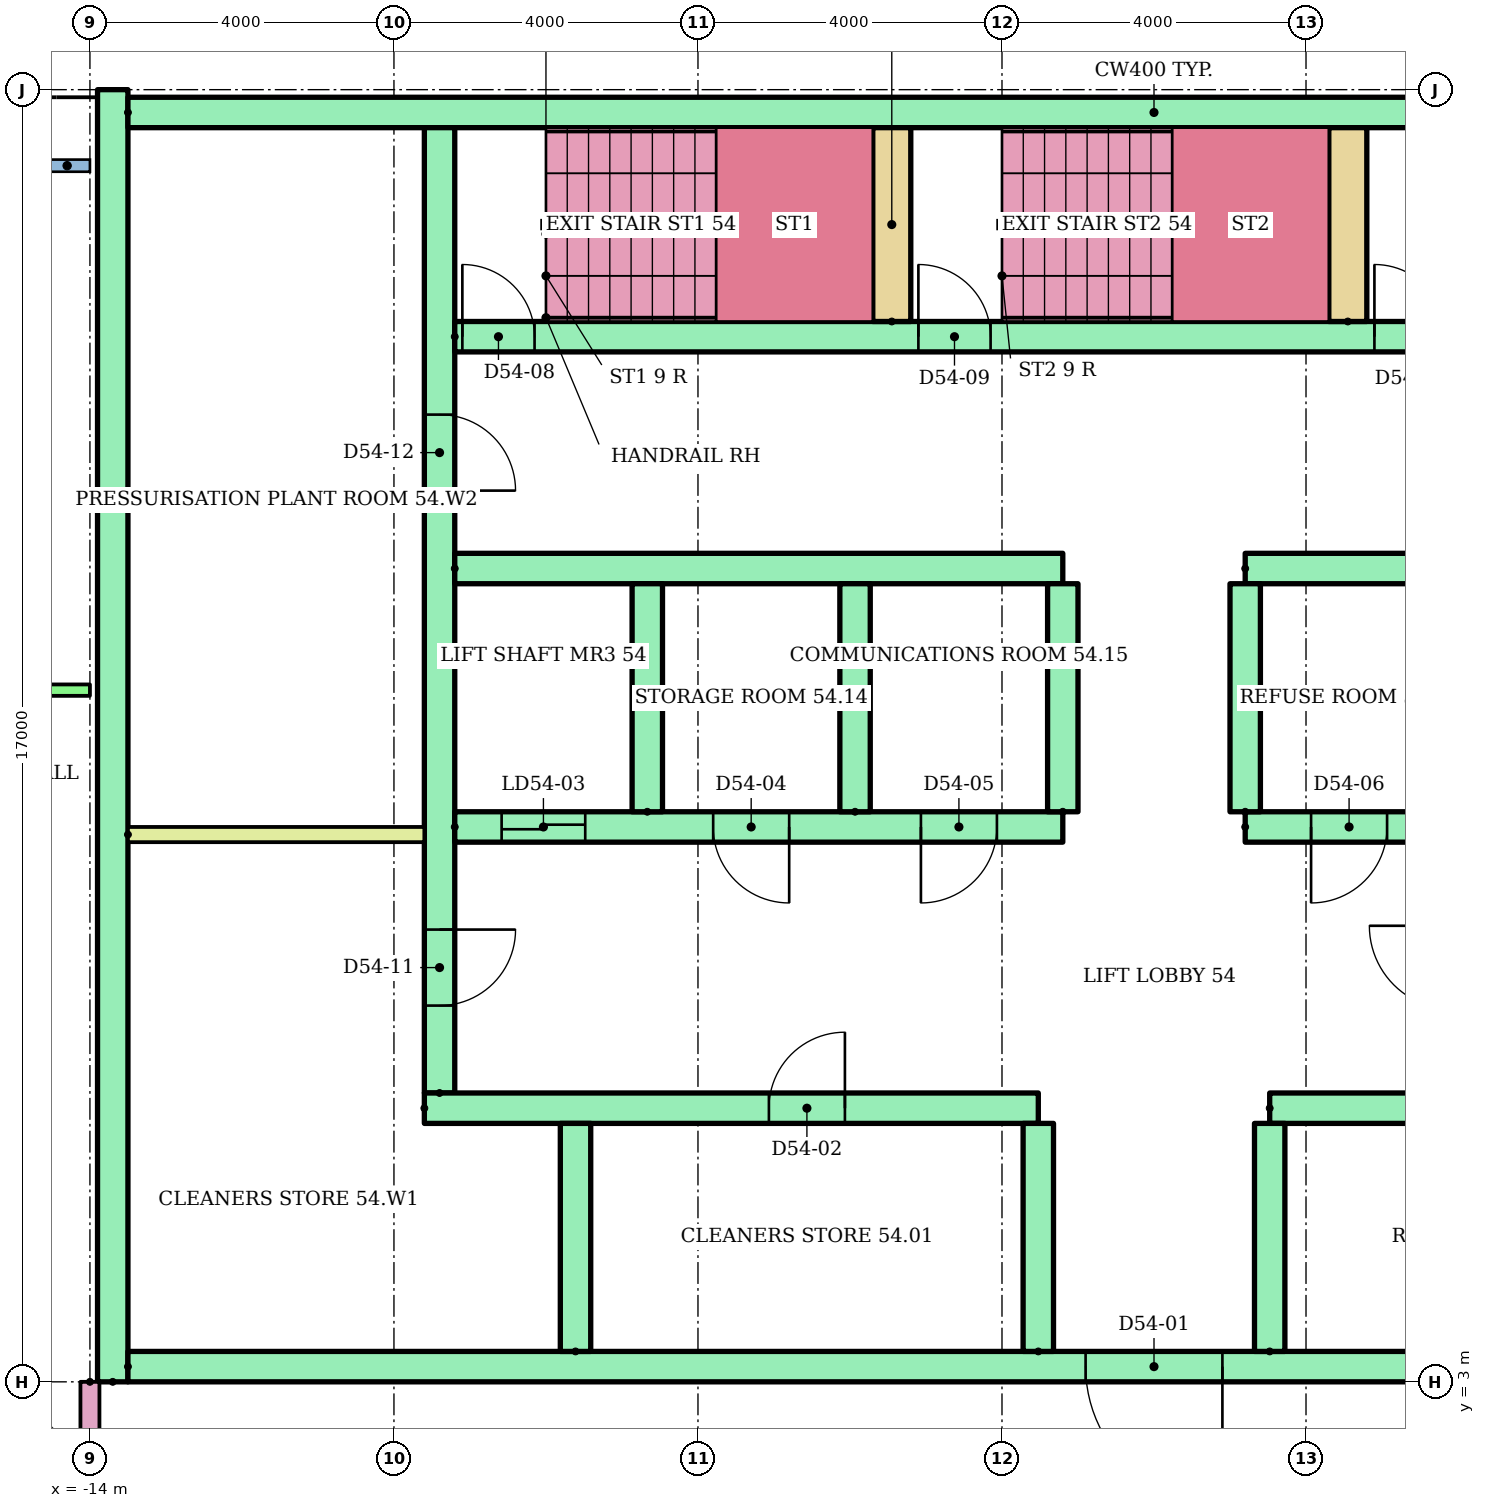
"""IFC4 building model, lengths in metres.
Left out: names, types, materials, properties, quantities, classifications, styles, units other than length and angle.
Written with IfcOpenShell. Run it as: python <this file> out.ifc"""

import sys

from ifc_helpers import new_model, si_unit, direction, frame, frame_2d, origin, place, context, subcontext, project, spatial, rectangle, extrude, element, fill, save


model = new_model("IFC4")
c1 = context("Model", 3, precision=1e-05, world=origin(), true_north=direction((0.0, 1.0)))
c2 = subcontext(c1, "Body", "Model", "MODEL_VIEW")
j1 = project(units=[si_unit("LENGTHUNIT", "METRE"), si_unit("PLANEANGLEUNIT", "RADIAN")], contexts=[c1])
p1 = place(None, origin())
s1 = spatial("IfcSite", under=j1, at=p1, CompositionType="ELEMENT")
p2 = place(p1, origin())
s2 = spatial("IfcBuilding", under=s1, at=p2, CompositionType="ELEMENT")
p3 = place(p2, frame((0.0, 0.0, 210.8)))
s3 = spatial("IfcBuildingStorey", under=s2, at=p3, CompositionType="ELEMENT", Elevation=210.8)
p4 = place(p3, frame((-13.7, 3.0, 0.0), z_axis=(0.0, 0.0, 1.0), x_axis=(0.0, 1.0, 0.0)))
e1 = element("IfcWall", 1, at=p4, inside=s3, PredefinedType="SHEAR", context=c2, shape_type="SweptSolid", body=[
    extrude(rectangle(XDim=17.0, YDim=0.4, at=frame_2d((8.5, 0.0))), origin(), (0.0, 0.0, 1.0), 2.92),
])
p5 = place(p3, frame((-13.5, 19.7, 0.0)))
e2 = element("IfcWall", 2, at=p5, inside=s3, PredefinedType="SHEAR", context=c2, shape_type="SweptSolid", body=[
    extrude(rectangle(XDim=27.0, YDim=0.4, at=frame_2d((13.5, 0.0))), origin(), (0.0, 0.0, 1.0), 2.92),
])
p6 = place(p3, frame((-9.4, 6.8, 0.0), z_axis=(0.0, 0.0, 1.0), x_axis=(0.0, 1.0, 0.0)))
e3 = element("IfcWall", 3, at=p6, inside=s3, PredefinedType="SHEAR", context=c2, shape_type="SweptSolid", body=[
    extrude(rectangle(XDim=12.7, YDim=0.4, at=frame_2d((6.35, 0.0))), origin(), (0.0, 0.0, 1.0), 2.92),
])
p7 = place(p6, frame((1.15, 0.0, 0.0)))
e4 = element("IfcOpeningElement", 4, at=p7, cuts=e3, PredefinedType="OPENING", context=c2, shape_type="SweptSolid", body=[
    extrude(rectangle(XDim=1.0, YDim=2.1, at=frame_2d((0.5, 1.05))), frame((0.0, 0.21, 0.0), z_axis=(0.0, -1.0, 0.0), x_axis=(1.0, 0.0, 0.0)), (0.0, 0.0, 1.0), 0.42),
])
p8 = place(p6, frame((7.925, 0.0, 0.0)))
e5 = element("IfcOpeningElement", 5, at=p8, cuts=e3, PredefinedType="OPENING", context=c2, shape_type="SweptSolid", body=[
    extrude(rectangle(XDim=1.0, YDim=2.1, at=frame_2d((0.5, 1.05))), frame((0.0, 0.21, 0.0), z_axis=(0.0, -1.0, 0.0), x_axis=(1.0, 0.0, 0.0)), (0.0, 0.0, 1.0), 0.42),
])
p9 = place(p3, frame((-13.5, 3.2, 0.0)))
e6 = element("IfcWall", 6, at=p9, inside=s3, PredefinedType="SHEAR", context=c2, shape_type="SweptSolid", body=[
    extrude(rectangle(XDim=27.0, YDim=0.4, at=frame_2d((13.5, 0.0))), origin(), (0.0, 0.0, 1.0), 2.92),
])
p10 = place(p9, frame((22.083, 0.0, 0.0)))
e7 = element("IfcOpeningElement", 7, at=p10, cuts=e6, PredefinedType="OPENING", context=c2, shape_type="SweptSolid", body=[
    extrude(rectangle(XDim=1.1, YDim=2.1, at=frame_2d((0.55, 1.05))), frame((0.0, 0.21, 0.0), z_axis=(0.0, -1.0, 0.0), x_axis=(1.0, 0.0, 0.0)), (0.0, 0.0, 1.0), 0.42),
])
p11 = place(p9, frame((25.128, 0.0, 0.0)))
e8 = element("IfcOpeningElement", 8, at=p11, cuts=e6, PredefinedType="OPENING", context=c2, shape_type="SweptSolid", body=[
    extrude(rectangle(XDim=1.1, YDim=2.1, at=frame_2d((0.55, 1.05))), frame((0.0, 0.21, 0.0), z_axis=(0.0, -1.0, 0.0), x_axis=(1.0, 0.0, 0.0)), (0.0, 0.0, 1.0), 0.42),
])
p12 = place(p9, frame((12.6, 0.0, 0.0)))
e9 = element("IfcOpeningElement", 9, at=p12, cuts=e6, PredefinedType="OPENING", context=c2, shape_type="SweptSolid", body=[
    extrude(rectangle(XDim=1.8, YDim=2.1, at=frame_2d((0.9, 1.05))), frame((0.0, 0.21, 0.0), z_axis=(0.0, -1.0, 0.0), x_axis=(1.0, 0.0, 0.0)), (0.0, 0.0, 1.0), 0.42),
])
p13 = place(p3, frame((-9.6, 6.6, 0.0)))
e10 = element("IfcWall", 10, at=p13, inside=s3, PredefinedType="SHEAR", context=c2, shape_type="SweptSolid", body=[
    extrude(rectangle(XDim=8.078, YDim=0.4, at=frame_2d((4.039, 0.0))), origin(), (0.0, 0.0, 1.0), 2.92),
])
p14 = place(p13, frame((4.533, 0.0, 0.0)))
e11 = element("IfcOpeningElement", 11, at=p14, cuts=e10, PredefinedType="OPENING", context=c2, shape_type="SweptSolid", body=[
    extrude(rectangle(XDim=1.0, YDim=2.1, at=frame_2d((0.5, 1.05))), frame((0.0, 0.21, 0.0), z_axis=(0.0, -1.0, 0.0), x_axis=(1.0, 0.0, 0.0)), (0.0, 0.0, 1.0), 0.42),
])
p15 = place(p3, frame((1.522, 6.6, 0.0)))
e12 = element("IfcWall", 12, at=p15, inside=s3, PredefinedType="SHEAR", context=c2, shape_type="SweptSolid", body=[
    extrude(rectangle(XDim=11.978, YDim=0.4, at=frame_2d((5.989, 0.0))), origin(), (0.0, 0.0, 1.0), 2.92),
])
p16 = place(p15, frame((2.544, 0.0, 0.0)))
e13 = element("IfcOpeningElement", 13, at=p16, cuts=e12, PredefinedType="OPENING", context=c2, shape_type="SweptSolid", body=[
    extrude(rectangle(XDim=1.0, YDim=2.1, at=frame_2d((0.5, 1.05))), frame((0.0, 0.21, 0.0), z_axis=(0.0, -1.0, 0.0), x_axis=(1.0, 0.0, 0.0)), (0.0, 0.0, 1.0), 0.42),
])
for number, where, z_axis, x_axis in (
    (14, (-7.611, 3.4, 0.0), (0.0, 0.0, 1.0), (0.0, 1.0, 0.0)),
    (15, (-1.522, 3.4, 0.0), (0.0, 0.0, 1.0), (0.0, 1.0, 0.0)),
    (16, (1.522, 3.4, 0.0), (0.0, 0.0, 1.0), (0.0, 1.0, 0.0)),
):
    element("IfcWall", number, at=place(p3, frame(where, z_axis=z_axis, x_axis=x_axis)), inside=s3, PredefinedType="SHEAR", context=c2, shape_type="SweptSolid", body=[
        extrude(rectangle(XDim=3.0, YDim=0.4, at=frame_2d((1.5, 0.0))), origin(), (0.0, 0.0, 1.0), 2.92),
    ])
p17 = place(p3, frame((-9.2, 10.3, 0.0)))
e17 = element("IfcWall", 17, at=p17, inside=s3, PredefinedType="SHEAR", context=c2, shape_type="SweptSolid", body=[
    extrude(rectangle(XDim=8.0, YDim=0.4, at=frame_2d((4.0, 0.0))), origin(), (0.0, 0.0, 1.0), 2.92),
])
p18 = place(p17, frame((0.617, 0.0, 0.0)))
e18 = element("IfcOpeningElement", 18, at=p18, cuts=e17, PredefinedType="OPENING", context=c2, shape_type="SweptSolid", body=[
    extrude(rectangle(XDim=1.1, YDim=2.1, at=frame_2d((0.55, 1.05))), frame((0.0, 0.21, 0.0), z_axis=(0.0, -1.0, 0.0), x_axis=(1.0, 0.0, 0.0)), (0.0, 0.0, 1.0), 0.42),
])
p19 = place(p17, frame((3.4, 0.0, 0.0)))
e19 = element("IfcOpeningElement", 19, at=p19, cuts=e17, PredefinedType="OPENING", context=c2, shape_type="SweptSolid", body=[
    extrude(rectangle(XDim=1.0, YDim=2.1, at=frame_2d((0.5, 1.05))), frame((0.0, 0.21, 0.0), z_axis=(0.0, -1.0, 0.0), x_axis=(1.0, 0.0, 0.0)), (0.0, 0.0, 1.0), 0.42),
])
p20 = place(p17, frame((6.133, 0.0, 0.0)))
e20 = element("IfcOpeningElement", 20, at=p20, cuts=e17, PredefinedType="OPENING", context=c2, shape_type="SweptSolid", body=[
    extrude(rectangle(XDim=1.0, YDim=2.1, at=frame_2d((0.5, 1.05))), frame((0.0, 0.21, 0.0), z_axis=(0.0, -1.0, 0.0), x_axis=(1.0, 0.0, 0.0)), (0.0, 0.0, 1.0), 0.42),
])
p21 = place(p3, frame((-9.2, 13.7, 0.0)))
e21 = element("IfcWall", 21, at=p21, inside=s3, PredefinedType="SHEAR", context=c2, shape_type="SweptSolid", body=[
    extrude(rectangle(XDim=8.0, YDim=0.4, at=frame_2d((4.0, 0.0))), origin(), (0.0, 0.0, 1.0), 2.92),
])
p22 = place(p3, frame((1.2, 10.3, 0.0)))
e22 = element("IfcWall", 22, at=p22, inside=s3, PredefinedType="SHEAR", context=c2, shape_type="SweptSolid", body=[
    extrude(rectangle(XDim=8.0, YDim=0.4, at=frame_2d((4.0, 0.0))), origin(), (0.0, 0.0, 1.0), 2.92),
])
p23 = place(p22, frame((3.55, 0.0, 0.0)))
e23 = element("IfcOpeningElement", 23, at=p23, cuts=e22, PredefinedType="OPENING", context=c2, shape_type="SweptSolid", body=[
    extrude(rectangle(XDim=1.1, YDim=2.1, at=frame_2d((0.55, 1.05))), frame((0.0, 0.21, 0.0), z_axis=(0.0, -1.0, 0.0), x_axis=(1.0, 0.0, 0.0)), (0.0, 0.0, 1.0), 0.42),
])
p24 = place(p22, frame((6.283, 0.0, 0.0)))
e24 = element("IfcOpeningElement", 24, at=p24, cuts=e22, PredefinedType="OPENING", context=c2, shape_type="SweptSolid", body=[
    extrude(rectangle(XDim=1.1, YDim=2.1, at=frame_2d((0.55, 1.05))), frame((0.0, 0.21, 0.0), z_axis=(0.0, -1.0, 0.0), x_axis=(1.0, 0.0, 0.0)), (0.0, 0.0, 1.0), 0.42),
])
p25 = place(p22, frame((0.867, 0.0, 0.0)))
e25 = element("IfcOpeningElement", 25, at=p25, cuts=e22, PredefinedType="OPENING", context=c2, shape_type="SweptSolid", body=[
    extrude(rectangle(XDim=1.0, YDim=2.1, at=frame_2d((0.5, 1.05))), frame((0.0, 0.21, 0.0), z_axis=(0.0, -1.0, 0.0), x_axis=(1.0, 0.0, 0.0)), (0.0, 0.0, 1.0), 0.42),
])
p26 = place(p3, frame((1.2, 13.7, 0.0)))
e26 = element("IfcWall", 26, at=p26, inside=s3, PredefinedType="SHEAR", context=c2, shape_type="SweptSolid", body=[
    extrude(rectangle(XDim=8.0, YDim=0.4, at=frame_2d((4.0, 0.0))), origin(), (0.0, 0.0, 1.0), 2.92),
])
for number, where, z_axis, x_axis in (
    (27, (-6.667, 10.5, 0.0), (0.0, 0.0, 1.0), (0.0, 1.0, 0.0)),
    (28, (-3.933, 10.5, 0.0), (0.0, 0.0, 1.0), (0.0, 1.0, 0.0)),
    (29, (-1.2, 10.5, 0.0), (0.0, 0.0, 1.0), (0.0, 1.0, 0.0)),
    (30, (1.2, 10.5, 0.0), (0.0, 0.0, 1.0), (0.0, 1.0, 0.0)),
):
    element("IfcWall", number, at=place(p3, frame(where, z_axis=z_axis, x_axis=x_axis)), inside=s3, PredefinedType="SHEAR", context=c2, shape_type="SweptSolid", body=[
        extrude(rectangle(XDim=3.0, YDim=0.4, at=frame_2d((1.5, 0.0))), origin(), (0.0, 0.0, 1.0), 2.92),
    ])
p27 = place(p3, frame((-9.2, 16.75, 0.0)))
e31 = element("IfcWall", 31, at=p27, inside=s3, PredefinedType="SHEAR", context=c2, shape_type="SweptSolid", body=[
    extrude(rectangle(XDim=18.4, YDim=0.4, at=frame_2d((9.2, 0.0))), origin(), (0.0, 0.0, 1.0), 2.92),
])
p28 = place(p27, frame((0.1, 0.0, 0.0)))
e32 = element("IfcOpeningElement", 32, at=p28, cuts=e31, PredefinedType="OPENING", context=c2, shape_type="SweptSolid", body=[
    extrude(rectangle(XDim=0.95, YDim=2.1, at=frame_2d((0.475, 1.05))), frame((0.0, 0.21, 0.0), z_axis=(0.0, -1.0, 0.0), x_axis=(1.0, 0.0, 0.0)), (0.0, 0.0, 1.0), 0.42),
])
p29 = place(p27, frame((6.1, 0.0, 0.0)))
e33 = element("IfcOpeningElement", 33, at=p29, cuts=e31, PredefinedType="OPENING", context=c2, shape_type="SweptSolid", body=[
    extrude(rectangle(XDim=0.95, YDim=2.1, at=frame_2d((0.475, 1.05))), frame((0.0, 0.21, 0.0), z_axis=(0.0, -1.0, 0.0), x_axis=(1.0, 0.0, 0.0)), (0.0, 0.0, 1.0), 0.42),
])
p30 = place(p27, frame((12.1, 0.0, 0.0)))
e34 = element("IfcOpeningElement", 34, at=p30, cuts=e31, PredefinedType="OPENING", context=c2, shape_type="SweptSolid", body=[
    extrude(rectangle(XDim=0.95, YDim=2.1, at=frame_2d((0.475, 1.05))), frame((0.0, 0.21, 0.0), z_axis=(0.0, -1.0, 0.0), x_axis=(1.0, 0.0, 0.0)), (0.0, 0.0, 1.0), 0.42),
])
for number, where, z_axis, x_axis in (
    (35, (-3.45, 16.95, 0.0), (0.0, 0.0, 1.0), (0.0, 1.0, 0.0)),
    (36, (2.55, 16.95, 0.0), (0.0, 0.0, 1.0), (0.0, 1.0, 0.0)),
):
    element("IfcWall", number, at=place(p3, frame(where, z_axis=z_axis, x_axis=x_axis)), inside=s3, PredefinedType="SHEAR", context=c2, shape_type="SweptSolid", body=[
        extrude(rectangle(XDim=2.55, YDim=0.5, at=frame_2d((1.275, 0.0))), origin(), (0.0, 0.0, 1.0), 2.92),
    ])
p31 = place(p3, frame((-13.5, 10.2, 0.0)))
e37 = element("IfcWall", 37, at=p31, inside=s3, PredefinedType="PARTITIONING", context=c2, shape_type="SweptSolid", body=[
    extrude(rectangle(XDim=3.9, YDim=0.2, at=frame_2d((1.95, 0.0))), origin(), (0.0, 0.0, 1.0), 2.92),
])
p32 = place(p3, frame((-28.92, 12.1, 0.0)))
e38 = element("IfcWall", 38, at=p32, inside=s3, PredefinedType="PARTITIONING", context=c2, shape_type="SweptSolid", body=[
    extrude(rectangle(XDim=14.92, YDim=0.15, at=frame_2d((7.46, 0.0))), origin(), (0.0, 0.0, 1.0), 2.4),
])
p33 = place(p32, frame((1.97, 0.0, 0.0)))
e39 = element("IfcOpeningElement", 39, at=p33, cuts=e38, PredefinedType="OPENING", context=c2, shape_type="SweptSolid", body=[
    extrude(rectangle(XDim=1.0, YDim=2.1, at=frame_2d((0.5, 1.05))), frame((0.0, 0.085, 0.0), z_axis=(0.0, -1.0, 0.0), x_axis=(1.0, 0.0, 0.0)), (0.0, 0.0, 1.0), 0.17),
])
p34 = place(p32, frame((9.37, 0.0, 0.0)))
e40 = element("IfcOpeningElement", 40, at=p34, cuts=e38, PredefinedType="OPENING", context=c2, shape_type="SweptSolid", body=[
    extrude(rectangle(XDim=0.9, YDim=2.1, at=frame_2d((0.45, 1.05))), frame((0.0, 0.085, 0.0), z_axis=(0.0, -1.0, 0.0), x_axis=(1.0, 0.0, 0.0)), (0.0, 0.0, 1.0), 0.17),
])
p35 = place(p3, frame((-14.0, 3.0, 0.0), z_axis=(0.0, 0.0, 1.0), x_axis=(0.0, -1.0, 0.0)))
e41 = element("IfcWall", 41, at=p35, inside=s3, PredefinedType="PARTITIONING", context=c2, shape_type="SweptSolid", body=[
    extrude(rectangle(XDim=1.6, YDim=0.25, at=frame_2d((0.8, 0.0))), origin(), (0.0, 0.0, 1.0), 2.4),
])
p36 = place(p12, frame((1.8, 0.0, 0.0), z_axis=(0.0, 0.0, 1.0), x_axis=(-1.0, 0.0, 0.0)))
e42 = element("IfcDoor", 42, at=p36, inside=s3, OperationType="DOUBLE_DOOR_SINGLE_SWING", PredefinedType="DOOR", context=c2, shape_type="SweptSolid", body=[
    extrude(rectangle(XDim=1.8, YDim=2.1, at=frame_2d((0.9, 1.05))), frame((0.0, 0.025, 0.0), z_axis=(0.0, -1.0, 0.0), x_axis=(1.0, 0.0, 0.0)), (0.0, 0.0, 1.0), 0.05),
])
fill(e9, e42)
p37 = place(p14, origin())
e43 = element("IfcDoor", 43, at=p37, inside=s3, OperationType="SINGLE_SWING_RIGHT", PredefinedType="DOOR", context=c2, shape_type="SweptSolid", body=[
    extrude(rectangle(XDim=1.0, YDim=2.1, at=frame_2d((0.5, 1.05))), frame((0.0, 0.025, 0.0), z_axis=(0.0, -1.0, 0.0), x_axis=(1.0, 0.0, 0.0)), (0.0, 0.0, 1.0), 0.05),
])
fill(e11, e43)
p38 = place(p18, origin())
e44 = element("IfcDoor", 44, at=p38, inside=s3, OperationType="SLIDING_TO_LEFT", PredefinedType="DOOR", context=c2, shape_type="SweptSolid", body=[
    extrude(rectangle(XDim=1.1, YDim=2.1, at=frame_2d((0.55, 1.05))), frame((0.0, 0.025, 0.0), z_axis=(0.0, -1.0, 0.0), x_axis=(1.0, 0.0, 0.0)), (0.0, 0.0, 1.0), 0.05),
])
fill(e18, e44)
p39 = place(p19, frame((1.0, 0.0, 0.0), z_axis=(0.0, 0.0, 1.0), x_axis=(-1.0, 0.0, 0.0)))
e45 = element("IfcDoor", 45, at=p39, inside=s3, OperationType="SINGLE_SWING_RIGHT", PredefinedType="DOOR", context=c2, shape_type="SweptSolid", body=[
    extrude(rectangle(XDim=1.0, YDim=2.1, at=frame_2d((0.5, 1.05))), frame((0.0, 0.025, 0.0), z_axis=(0.0, -1.0, 0.0), x_axis=(1.0, 0.0, 0.0)), (0.0, 0.0, 1.0), 0.05),
])
fill(e19, e45)
p40 = place(p20, frame((1.0, 0.0, 0.0), z_axis=(0.0, 0.0, 1.0), x_axis=(-1.0, 0.0, 0.0)))
e46 = element("IfcDoor", 46, at=p40, inside=s3, OperationType="SINGLE_SWING_LEFT", PredefinedType="DOOR", context=c2, shape_type="SweptSolid", body=[
    extrude(rectangle(XDim=1.0, YDim=2.1, at=frame_2d((0.5, 1.05))), frame((0.0, 0.025, 0.0), z_axis=(0.0, -1.0, 0.0), x_axis=(1.0, 0.0, 0.0)), (0.0, 0.0, 1.0), 0.05),
])
fill(e20, e46)
p41 = place(p25, frame((1.0, 0.0, 0.0), z_axis=(0.0, 0.0, 1.0), x_axis=(-1.0, 0.0, 0.0)))
e47 = element("IfcDoor", 47, at=p41, inside=s3, OperationType="SINGLE_SWING_LEFT", PredefinedType="DOOR", context=c2, shape_type="SweptSolid", body=[
    extrude(rectangle(XDim=1.0, YDim=2.1, at=frame_2d((0.5, 1.05))), frame((0.0, 0.025, 0.0), z_axis=(0.0, -1.0, 0.0), x_axis=(1.0, 0.0, 0.0)), (0.0, 0.0, 1.0), 0.05),
])
fill(e25, e47)
p42 = place(p28, origin())
e48 = element("IfcDoor", 48, at=p42, inside=s3, OperationType="SINGLE_SWING_LEFT", PredefinedType="DOOR", context=c2, shape_type="SweptSolid", body=[
    extrude(rectangle(XDim=0.95, YDim=2.1, at=frame_2d((0.475, 1.05))), frame((0.0, 0.025, 0.0), z_axis=(0.0, -1.0, 0.0), x_axis=(1.0, 0.0, 0.0)), (0.0, 0.0, 1.0), 0.05),
])
fill(e32, e48)
p43 = place(p29, origin())
e49 = element("IfcDoor", 49, at=p43, inside=s3, OperationType="SINGLE_SWING_LEFT", PredefinedType="DOOR", context=c2, shape_type="SweptSolid", body=[
    extrude(rectangle(XDim=0.95, YDim=2.1, at=frame_2d((0.475, 1.05))), frame((0.0, 0.025, 0.0), z_axis=(0.0, -1.0, 0.0), x_axis=(1.0, 0.0, 0.0)), (0.0, 0.0, 1.0), 0.05),
])
fill(e33, e49)
p44 = place(p30, origin())
e50 = element("IfcDoor", 50, at=p44, inside=s3, OperationType="SINGLE_SWING_LEFT", PredefinedType="DOOR", context=c2, shape_type="SweptSolid", body=[
    extrude(rectangle(XDim=0.95, YDim=2.1, at=frame_2d((0.475, 1.05))), frame((0.0, 0.025, 0.0), z_axis=(0.0, -1.0, 0.0), x_axis=(1.0, 0.0, 0.0)), (0.0, 0.0, 1.0), 0.05),
])
fill(e34, e50)
p45 = place(p7, frame((1.0, 0.0, 0.0), z_axis=(0.0, 0.0, 1.0), x_axis=(-1.0, 0.0, 0.0)))
e51 = element("IfcDoor", 51, at=p45, inside=s3, OperationType="SINGLE_SWING_RIGHT", PredefinedType="DOOR", context=c2, shape_type="SweptSolid", body=[
    extrude(rectangle(XDim=1.0, YDim=2.1, at=frame_2d((0.5, 1.05))), frame((0.0, 0.025, 0.0), z_axis=(0.0, -1.0, 0.0), x_axis=(1.0, 0.0, 0.0)), (0.0, 0.0, 1.0), 0.05),
])
fill(e4, e51)
p46 = place(p8, frame((1.0, 0.0, 0.0), z_axis=(0.0, 0.0, 1.0), x_axis=(-1.0, 0.0, 0.0)))
e52 = element("IfcDoor", 52, at=p46, inside=s3, OperationType="SINGLE_SWING_LEFT", PredefinedType="DOOR", context=c2, shape_type="SweptSolid", body=[
    extrude(rectangle(XDim=1.0, YDim=2.1, at=frame_2d((0.5, 1.05))), frame((0.0, 0.025, 0.0), z_axis=(0.0, -1.0, 0.0), x_axis=(1.0, 0.0, 0.0)), (0.0, 0.0, 1.0), 0.05),
])
fill(e5, e52)
save(model, sys.argv[1])
